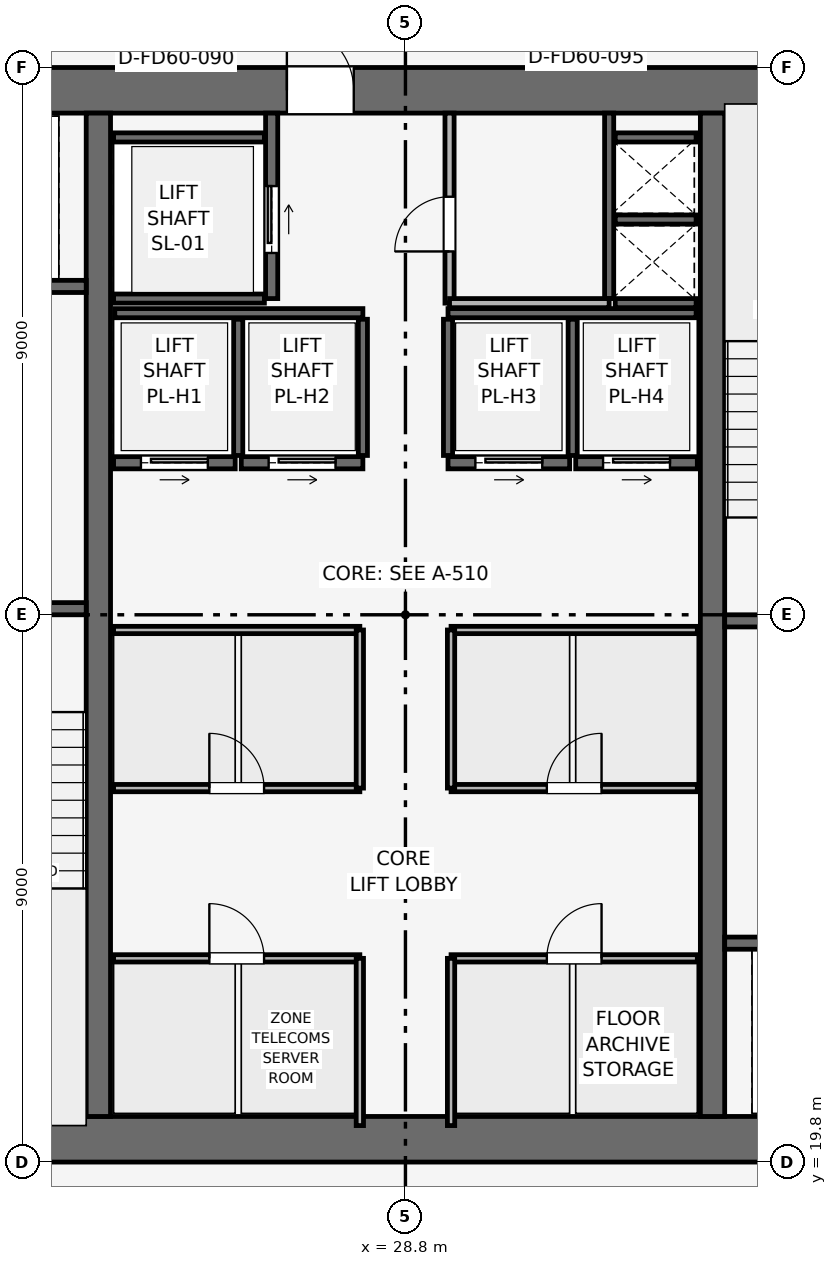
"""IFC4 building model, lengths in metres.
Left out: names, types, materials, properties, quantities, classifications, styles, units other than length and angle.
Written with IfcOpenShell. Run it as: python <this file> out.ifc"""

import sys

from ifc_helpers import new_model, si_unit, direction, frame, frame_2d, origin, place, context, subcontext, project, spatial, rectangle, extrude, element, fill, save


model = new_model("IFC4")
c1 = context("Model", 3, precision=1e-05, world=origin(), true_north=direction((0.0, 1.0)))
c2 = subcontext(c1, "Body", "Model", "MODEL_VIEW")
j1 = project(units=[si_unit("LENGTHUNIT", "METRE"), si_unit("PLANEANGLEUNIT", "RADIAN")], contexts=[c1])
p1 = place(None, origin())
s1 = spatial("IfcSite", under=j1, at=p1, CompositionType="ELEMENT")
p2 = place(p1, origin())
s2 = spatial("IfcBuilding", under=s1, at=p2, CompositionType="ELEMENT")
p3 = place(p2, frame((0.0, 0.0, 272.85)))
s3 = spatial("IfcBuildingStorey", under=s2, at=p3, CompositionType="ELEMENT", Elevation=272.85)
p4 = place(p3, frame((19.8, 20.175, 0.0), z_axis=(0.0, 0.0, 1.0), x_axis=(1.0, 0.0, 0.0)))
e1 = element("IfcWall", 1, at=p4, inside=s3, PredefinedType="SHEAR", context=c2, shape_type="SweptSolid", body=[
    extrude(rectangle(XDim=18.0, YDim=0.75, at=frame_2d((9.0, 0.0))), origin(), (0.0, 0.0, 1.0), 3.75),
])
p5 = place(p3, frame((19.8, 37.425, 0.0), z_axis=(0.0, 0.0, 1.0), x_axis=(1.0, 0.0, 0.0)))
e2 = element("IfcWall", 2, at=p5, inside=s3, PredefinedType="SHEAR", context=c2, shape_type="SweptSolid", body=[
    extrude(rectangle(XDim=18.0, YDim=0.75, at=frame_2d((9.0, 0.0))), origin(), (0.0, 0.0, 1.0), 3.75),
])
p6 = place(p5, frame((7.05, 0.0, 0.0)))
e3 = element("IfcOpeningElement", 3, at=p6, cuts=e2, PredefinedType="OPENING", context=c2, shape_type="SweptSolid", body=[
    extrude(rectangle(XDim=1.1, YDim=2.15, at=frame_2d((0.55, 1.075))), frame((0.0, 0.385, 0.0), z_axis=(0.0, -1.0, 0.0), x_axis=(1.0, 0.0, 0.0)), (0.0, 0.0, 1.0), 0.77),
])
for number, where, z_axis, x_axis in (
    (4, (23.75, 20.55, 0.0), (0.0, 0.0, 1.0), (0.0, 1.0, 0.0)),
    (5, (33.85, 20.55, 0.0), (0.0, 0.0, 1.0), (0.0, 1.0, 0.0)),
):
    element("IfcWall", number, at=place(p3, frame(where, z_axis=z_axis, x_axis=x_axis)), inside=s3, PredefinedType="SHEAR", context=c2, shape_type="SweptSolid", body=[
        extrude(rectangle(XDim=16.5, YDim=0.4, at=frame_2d((8.25, 0.0))), origin(), (0.0, 0.0, 1.0), 3.75),
    ])
p7 = place(p3, frame((20.4, 28.9, 0.0), z_axis=(0.0, 0.0, 1.0), x_axis=(1.0, 0.0, 0.0)))
e6 = element("IfcWall", 6, at=p7, inside=s3, PredefinedType="SHEAR", context=c2, shape_type="SweptSolid", body=[
    extrude(rectangle(XDim=3.15, YDim=0.2, at=frame_2d((1.575, 0.0))), origin(), (0.0, 0.0, 1.0), 3.5),
])
p8 = place(p7, frame((0.8, 0.0, 0.0)))
e7 = element("IfcOpeningElement", 7, at=p8, cuts=e6, PredefinedType="OPENING", context=c2, shape_type="SweptSolid", body=[
    extrude(rectangle(XDim=1.0, YDim=2.1, at=frame_2d((0.5, 1.05))), frame((0.0, 0.11, 0.0), z_axis=(0.0, -1.0, 0.0), x_axis=(1.0, 0.0, 0.0)), (0.0, 0.0, 1.0), 0.22),
])
p9 = place(p3, frame((34.05, 28.7, 0.0), z_axis=(0.0, 0.0, 1.0), x_axis=(1.0, 0.0, 0.0)))
e8 = element("IfcWall", 8, at=p9, inside=s3, PredefinedType="SHEAR", context=c2, shape_type="SweptSolid", body=[
    extrude(rectangle(XDim=3.15, YDim=0.2, at=frame_2d((1.575, 0.0))), origin(), (0.0, 0.0, 1.0), 3.5),
])
p10 = place(p9, frame((0.8, 0.0, 0.0)))
e9 = element("IfcOpeningElement", 9, at=p10, cuts=e8, PredefinedType="OPENING", context=c2, shape_type="SweptSolid", body=[
    extrude(rectangle(XDim=1.0, YDim=2.1, at=frame_2d((0.5, 1.05))), frame((0.0, 0.11, 0.0), z_axis=(0.0, -1.0, 0.0), x_axis=(1.0, 0.0, 0.0)), (0.0, 0.0, 1.0), 0.22),
])
p11 = place(p3, frame((32.15, 34.0, 0.0), z_axis=(0.0, 0.0, 1.0), x_axis=(0.0, 1.0, 0.0)))
e10 = element("IfcWall", 10, at=p11, inside=s3, PredefinedType="SHEAR", context=c2, shape_type="SweptSolid", body=[
    extrude(rectangle(XDim=3.05, YDim=0.15, at=frame_2d((1.525, 0.0))), origin(), (0.0, 0.0, 1.0), 3.5),
])
for number, where, z_axis, x_axis in (
    (11, (32.25, 33.925, 0.0), (0.0, 0.0, 1.0), (1.0, 0.0, 0.0)),
    (12, (32.25, 35.3, 0.0), (0.0, 0.0, 1.0), (1.0, 0.0, 0.0)),
):
    element("IfcWall", number, at=place(p3, frame(where, z_axis=z_axis, x_axis=x_axis)), inside=s3, PredefinedType="SHEAR", context=c2, shape_type="SweptSolid", body=[
        extrude(rectangle(XDim=1.33, YDim=0.15, at=frame_2d((0.665, 0.0))), origin(), (0.0, 0.0, 1.0), 3.5),
    ])
p12 = place(p3, frame((20.5, 34.2, 0.0), z_axis=(0.0, 0.0, 1.0), x_axis=(1.0, 0.0, 0.0)))
e13 = element("IfcWall", 13, at=p12, inside=s3, PredefinedType="SHEAR", context=c2, shape_type="SweptSolid", body=[
    extrude(rectangle(XDim=3.05, YDim=0.2, at=frame_2d((1.525, 0.0))), origin(), (0.0, 0.0, 1.0), 3.5),
])
p13 = place(p12, frame((0.75, 0.0, 0.0)))
e14 = element("IfcOpeningElement", 14, at=p13, cuts=e13, PredefinedType="OPENING", context=c2, shape_type="SweptSolid", body=[
    extrude(rectangle(XDim=1.1, YDim=2.15, at=frame_2d((0.55, 1.075))), frame((0.0, 0.11, 0.0), z_axis=(0.0, -1.0, 0.0), x_axis=(1.0, 0.0, 0.0)), (0.0, 0.0, 1.0), 0.22),
])
p14 = place(p3, frame((34.05, 23.4, 0.0), z_axis=(0.0, 0.0, 1.0), x_axis=(1.0, 0.0, 0.0)))
e15 = element("IfcWall", 15, at=p14, inside=s3, PredefinedType="SHEAR", context=c2, shape_type="SweptSolid", body=[
    extrude(rectangle(XDim=3.05, YDim=0.2, at=frame_2d((1.525, 0.0))), origin(), (0.0, 0.0, 1.0), 3.5),
])
p15 = place(p14, frame((1.2, 0.0, 0.0)))
e16 = element("IfcOpeningElement", 16, at=p15, cuts=e15, PredefinedType="OPENING", context=c2, shape_type="SweptSolid", body=[
    extrude(rectangle(XDim=1.1, YDim=2.15, at=frame_2d((0.55, 1.075))), frame((0.0, 0.11, 0.0), z_axis=(0.0, -1.0, 0.0), x_axis=(1.0, 0.0, 0.0)), (0.0, 0.0, 1.0), 0.22),
])
p16 = place(p3, frame((26.6, 34.0, 0.0), z_axis=(0.0, 0.0, 1.0), x_axis=(0.0, 1.0, 0.0)))
e17 = element("IfcWall", 17, at=p16, inside=s3, PredefinedType="SHEAR", context=c2, shape_type="SweptSolid", body=[
    extrude(rectangle(XDim=3.05, YDim=0.2, at=frame_2d((1.525, 0.0))), origin(), (0.0, 0.0, 1.0), 3.5),
])
p17 = place(p16, frame((0.75, 0.0, 0.0)))
e18 = element("IfcOpeningElement", 18, at=p17, cuts=e17, PredefinedType="OPENING", context=c2, shape_type="SweptSolid", body=[
    extrude(rectangle(XDim=1.1, YDim=2.15, at=frame_2d((0.55, 1.075))), frame((0.0, 0.11, 0.0), z_axis=(0.0, -1.0, 0.0), x_axis=(1.0, 0.0, 0.0)), (0.0, 0.0, 1.0), 0.22),
])
for number, where, z_axis, x_axis in (
    (19, (24.0, 34.0, 0.0), (0.0, 0.0, 1.0), (1.0, 0.0, 0.0)),
    (20, (24.0, 36.65, 0.0), (0.0, 0.0, 1.0), (1.0, 0.0, 0.0)),
):
    element("IfcWall", number, at=place(p3, frame(where, z_axis=z_axis, x_axis=x_axis)), inside=s3, PredefinedType="SHEAR", context=c2, shape_type="SweptSolid", body=[
        extrude(rectangle(XDim=2.48, YDim=0.15, at=frame_2d((1.24, 0.0))), origin(), (0.0, 0.0, 1.0), 3.5),
    ])
p18 = place(p3, frame((24.0, 31.3, 0.0), z_axis=(0.0, 0.0, 1.0), x_axis=(1.0, 0.0, 0.0)))
e21 = element("IfcWall", 21, at=p18, inside=s3, PredefinedType="SHEAR", context=c2, shape_type="SweptSolid", body=[
    extrude(rectangle(XDim=2.0, YDim=0.2, at=frame_2d((1.0, 0.0))), origin(), (0.0, 0.0, 1.0), 3.5),
])
p19 = place(p18, frame((0.45, 0.0, 0.0)))
e22 = element("IfcOpeningElement", 22, at=p19, cuts=e21, PredefinedType="OPENING", context=c2, shape_type="SweptSolid", body=[
    extrude(rectangle(XDim=1.1, YDim=2.15, at=frame_2d((0.55, 1.075))), frame((0.0, 0.11, 0.0), z_axis=(0.0, -1.0, 0.0), x_axis=(1.0, 0.0, 0.0)), (0.0, 0.0, 1.0), 0.22),
])
p20 = place(p3, frame((26.1, 31.3, 0.0), z_axis=(0.0, 0.0, 1.0), x_axis=(1.0, 0.0, 0.0)))
e23 = element("IfcWall", 23, at=p20, inside=s3, PredefinedType="SHEAR", context=c2, shape_type="SweptSolid", body=[
    extrude(rectangle(XDim=2.0, YDim=0.2, at=frame_2d((1.0, 0.0))), origin(), (0.0, 0.0, 1.0), 3.5),
])
p21 = place(p20, frame((0.45, 0.0, 0.0)))
e24 = element("IfcOpeningElement", 24, at=p21, cuts=e23, PredefinedType="OPENING", context=c2, shape_type="SweptSolid", body=[
    extrude(rectangle(XDim=1.1, YDim=2.15, at=frame_2d((0.55, 1.075))), frame((0.0, 0.11, 0.0), z_axis=(0.0, -1.0, 0.0), x_axis=(1.0, 0.0, 0.0)), (0.0, 0.0, 1.0), 0.22),
])
p22 = place(p3, frame((29.5, 31.3, 0.0), z_axis=(0.0, 0.0, 1.0), x_axis=(1.0, 0.0, 0.0)))
e25 = element("IfcWall", 25, at=p22, inside=s3, PredefinedType="SHEAR", context=c2, shape_type="SweptSolid", body=[
    extrude(rectangle(XDim=2.0, YDim=0.2, at=frame_2d((1.0, 0.0))), origin(), (0.0, 0.0, 1.0), 3.5),
])
p23 = place(p22, frame((0.45, 0.0, 0.0)))
e26 = element("IfcOpeningElement", 26, at=p23, cuts=e25, PredefinedType="OPENING", context=c2, shape_type="SweptSolid", body=[
    extrude(rectangle(XDim=1.1, YDim=2.15, at=frame_2d((0.55, 1.075))), frame((0.0, 0.11, 0.0), z_axis=(0.0, -1.0, 0.0), x_axis=(1.0, 0.0, 0.0)), (0.0, 0.0, 1.0), 0.22),
])
p24 = place(p3, frame((31.6, 31.3, 0.0), z_axis=(0.0, 0.0, 1.0), x_axis=(1.0, 0.0, 0.0)))
e27 = element("IfcWall", 27, at=p24, inside=s3, PredefinedType="SHEAR", context=c2, shape_type="SweptSolid", body=[
    extrude(rectangle(XDim=2.0, YDim=0.2, at=frame_2d((1.0, 0.0))), origin(), (0.0, 0.0, 1.0), 3.5),
])
p25 = place(p24, frame((0.45, 0.0, 0.0)))
e28 = element("IfcOpeningElement", 28, at=p25, cuts=e27, PredefinedType="OPENING", context=c2, shape_type="SweptSolid", body=[
    extrude(rectangle(XDim=1.1, YDim=2.15, at=frame_2d((0.55, 1.075))), frame((0.0, 0.11, 0.0), z_axis=(0.0, -1.0, 0.0), x_axis=(1.0, 0.0, 0.0)), (0.0, 0.0, 1.0), 0.22),
])
p26 = place(p3, frame((32.25, 36.65, 0.0), z_axis=(0.0, 0.0, 1.0), x_axis=(1.0, 0.0, 0.0)))
e29 = element("IfcWall", 29, at=p26, inside=s3, PredefinedType="SHEAR", context=c2, shape_type="SweptSolid", body=[
    extrude(rectangle(XDim=1.33, YDim=0.15, at=frame_2d((0.665, 0.0))), origin(), (0.0, 0.0, 1.0), 3.5),
])
for number, where, z_axis, x_axis in (
    (30, (24.02, 33.76, 0.0), (0.0, 0.0, 1.0), (1.0, 0.0, 0.0)),
    (31, (29.5, 33.76, 0.0), (0.0, 0.0, 1.0), (1.0, 0.0, 0.0)),
):
    element("IfcWall", number, at=place(p3, frame(where, z_axis=z_axis, x_axis=x_axis)), inside=s3, PredefinedType="SHEAR", context=c2, shape_type="SweptSolid", body=[
        extrude(rectangle(XDim=4.08, YDim=0.15, at=frame_2d((2.04, 0.0))), origin(), (0.0, 0.0, 1.0), 3.5),
    ])
for number, where, z_axis, x_axis in (
    (32, (26.05, 31.42, 0.0), (0.0, 0.0, 1.0), (0.0, 1.0, 0.0)),
    (33, (28.1, 31.42, 0.0), (0.0, 0.0, 1.0), (0.0, 1.0, 0.0)),
    (34, (29.5, 31.42, 0.0), (0.0, 0.0, 1.0), (0.0, 1.0, 0.0)),
    (35, (31.55, 31.42, 0.0), (0.0, 0.0, 1.0), (0.0, 1.0, 0.0)),
):
    element("IfcWall", number, at=place(p3, frame(where, z_axis=z_axis, x_axis=x_axis)), inside=s3, PredefinedType="SHEAR", context=c2, shape_type="SweptSolid", body=[
        extrude(rectangle(XDim=2.24, YDim=0.15, at=frame_2d((1.12, 0.0))), origin(), (0.0, 0.0, 1.0), 3.5),
    ])
p27 = place(p3, frame((29.525, 33.925, 0.0), z_axis=(0.0, 0.0, 1.0), x_axis=(0.0, 1.0, 0.0)))
e36 = element("IfcWall", 36, at=p27, inside=s3, PredefinedType="PARTITIONING", context=c2, shape_type="SweptSolid", body=[
    extrude(rectangle(XDim=3.125, YDim=0.15, at=frame_2d((1.562, 0.0))), origin(), (0.0, 0.0, 1.0), 3.5),
])
p28 = place(p27, frame((0.85, 0.0, 0.0)))
e37 = element("IfcOpeningElement", 37, at=p28, cuts=e36, PredefinedType="OPENING", context=c2, shape_type="SweptSolid", body=[
    extrude(rectangle(XDim=0.9, YDim=2.1, at=frame_2d((0.45, 1.05))), frame((0.0, 0.085, 0.0), z_axis=(0.0, -1.0, 0.0), x_axis=(1.0, 0.0, 0.0)), (0.0, 0.0, 1.0), 0.17),
])
p29 = place(p3, frame((29.525, 33.925, 0.0), z_axis=(0.0, 0.0, 1.0), x_axis=(1.0, 0.0, 0.0)))
e38 = element("IfcWall", 38, at=p29, inside=s3, PredefinedType="PARTITIONING", context=c2, shape_type="SweptSolid", body=[
    extrude(rectangle(XDim=2.625, YDim=0.15, at=frame_2d((1.312, 0.0))), origin(), (0.0, 0.0, 1.0), 3.5),
])
p30 = place(p3, frame((24.0, 23.15, 0.0), z_axis=(0.0, 0.0, 1.0), x_axis=(1.0, 0.0, 0.0)))
e39 = element("IfcWall", 39, at=p30, inside=s3, PredefinedType="PARTITIONING", context=c2, shape_type="SweptSolid", body=[
    extrude(rectangle(XDim=4.05, YDim=0.12, at=frame_2d((2.025, 0.0))), origin(), (0.0, 0.0, 1.0), 3.5),
])
p31 = place(p30, frame((1.575, 0.0, 0.0)))
e40 = element("IfcOpeningElement", 40, at=p31, cuts=e39, PredefinedType="OPENING", context=c2, shape_type="SweptSolid", body=[
    extrude(rectangle(XDim=0.9, YDim=2.1, at=frame_2d((0.45, 1.05))), frame((0.0, 0.07, 0.0), z_axis=(0.0, -1.0, 0.0), x_axis=(1.0, 0.0, 0.0)), (0.0, 0.0, 1.0), 0.14),
])
p32 = place(p3, frame((28.05, 20.4, 0.0), z_axis=(0.0, 0.0, 1.0), x_axis=(0.0, 1.0, 0.0)))
e41 = element("IfcWall", 41, at=p32, inside=s3, PredefinedType="PARTITIONING", context=c2, shape_type="SweptSolid", body=[
    extrude(rectangle(XDim=2.75, YDim=0.12, at=frame_2d((1.375, 0.0))), origin(), (0.0, 0.0, 1.0), 3.5),
])
p33 = place(p3, frame((29.55, 23.15, 0.0), z_axis=(0.0, 0.0, 1.0), x_axis=(1.0, 0.0, 0.0)))
e42 = element("IfcWall", 42, at=p33, inside=s3, PredefinedType="PARTITIONING", context=c2, shape_type="SweptSolid", body=[
    extrude(rectangle(XDim=4.05, YDim=0.12, at=frame_2d((2.025, 0.0))), origin(), (0.0, 0.0, 1.0), 3.5),
])
p34 = place(p33, frame((1.575, 0.0, 0.0)))
e43 = element("IfcOpeningElement", 43, at=p34, cuts=e42, PredefinedType="OPENING", context=c2, shape_type="SweptSolid", body=[
    extrude(rectangle(XDim=0.9, YDim=2.1, at=frame_2d((0.45, 1.05))), frame((0.0, 0.07, 0.0), z_axis=(0.0, -1.0, 0.0), x_axis=(1.0, 0.0, 0.0)), (0.0, 0.0, 1.0), 0.14),
])
p35 = place(p3, frame((29.55, 20.4, 0.0), z_axis=(0.0, 0.0, 1.0), x_axis=(0.0, 1.0, 0.0)))
e44 = element("IfcWall", 44, at=p35, inside=s3, PredefinedType="PARTITIONING", context=c2, shape_type="SweptSolid", body=[
    extrude(rectangle(XDim=2.75, YDim=0.12, at=frame_2d((1.375, 0.0))), origin(), (0.0, 0.0, 1.0), 3.5),
])
p36 = place(p3, frame((24.0, 25.95, 0.0), z_axis=(0.0, 0.0, 1.0), x_axis=(1.0, 0.0, 0.0)))
e45 = element("IfcWall", 45, at=p36, inside=s3, PredefinedType="PARTITIONING", context=c2, shape_type="SweptSolid", body=[
    extrude(rectangle(XDim=4.05, YDim=0.12, at=frame_2d((2.025, 0.0))), origin(), (0.0, 0.0, 1.0), 3.5),
])
p37 = place(p36, frame((1.575, 0.0, 0.0)))
e46 = element("IfcOpeningElement", 46, at=p37, cuts=e45, PredefinedType="OPENING", context=c2, shape_type="SweptSolid", body=[
    extrude(rectangle(XDim=0.9, YDim=2.1, at=frame_2d((0.45, 1.05))), frame((0.0, 0.07, 0.0), z_axis=(0.0, -1.0, 0.0), x_axis=(1.0, 0.0, 0.0)), (0.0, 0.0, 1.0), 0.14),
])
p38 = place(p3, frame((24.0, 28.55, 0.0), z_axis=(0.0, 0.0, 1.0), x_axis=(1.0, 0.0, 0.0)))
e47 = element("IfcWall", 47, at=p38, inside=s3, PredefinedType="PARTITIONING", context=c2, shape_type="SweptSolid", body=[
    extrude(rectangle(XDim=4.05, YDim=0.12, at=frame_2d((2.025, 0.0))), origin(), (0.0, 0.0, 1.0), 3.5),
])
p39 = place(p3, frame((28.05, 25.95, 0.0), z_axis=(0.0, 0.0, 1.0), x_axis=(0.0, 1.0, 0.0)))
e48 = element("IfcWall", 48, at=p39, inside=s3, PredefinedType="PARTITIONING", context=c2, shape_type="SweptSolid", body=[
    extrude(rectangle(XDim=2.6, YDim=0.12, at=frame_2d((1.3, 0.0))), origin(), (0.0, 0.0, 1.0), 3.5),
])
p40 = place(p3, frame((29.55, 25.95, 0.0), z_axis=(0.0, 0.0, 1.0), x_axis=(1.0, 0.0, 0.0)))
e49 = element("IfcWall", 49, at=p40, inside=s3, PredefinedType="PARTITIONING", context=c2, shape_type="SweptSolid", body=[
    extrude(rectangle(XDim=4.05, YDim=0.12, at=frame_2d((2.025, 0.0))), origin(), (0.0, 0.0, 1.0), 3.5),
])
p41 = place(p40, frame((1.575, 0.0, 0.0)))
e50 = element("IfcOpeningElement", 50, at=p41, cuts=e49, PredefinedType="OPENING", context=c2, shape_type="SweptSolid", body=[
    extrude(rectangle(XDim=0.9, YDim=2.1, at=frame_2d((0.45, 1.05))), frame((0.0, 0.07, 0.0), z_axis=(0.0, -1.0, 0.0), x_axis=(1.0, 0.0, 0.0)), (0.0, 0.0, 1.0), 0.14),
])
p42 = place(p3, frame((29.55, 28.55, 0.0), z_axis=(0.0, 0.0, 1.0), x_axis=(1.0, 0.0, 0.0)))
e51 = element("IfcWall", 51, at=p42, inside=s3, PredefinedType="PARTITIONING", context=c2, shape_type="SweptSolid", body=[
    extrude(rectangle(XDim=4.05, YDim=0.12, at=frame_2d((2.025, 0.0))), origin(), (0.0, 0.0, 1.0), 3.5),
])
p43 = place(p3, frame((29.55, 25.95, 0.0), z_axis=(0.0, 0.0, 1.0), x_axis=(0.0, 1.0, 0.0)))
e52 = element("IfcWall", 52, at=p43, inside=s3, PredefinedType="PARTITIONING", context=c2, shape_type="SweptSolid", body=[
    extrude(rectangle(XDim=2.6, YDim=0.12, at=frame_2d((1.3, 0.0))), origin(), (0.0, 0.0, 1.0), 3.5),
])
p44 = place(p17, origin())
e53 = element("IfcDoor", 53, at=p44, inside=s3, OperationType="SLIDING_TO_RIGHT", PredefinedType="DOOR", context=c2, shape_type="SweptSolid", body=[
    extrude(rectangle(XDim=1.1, YDim=2.15, at=frame_2d((0.55, 1.075))), frame((0.0, 0.025, 0.0), z_axis=(0.0, -1.0, 0.0), x_axis=(1.0, 0.0, 0.0)), (0.0, 0.0, 1.0), 0.05),
])
fill(e18, e53)
p45 = place(p19, origin())
e54 = element("IfcDoor", 54, at=p45, inside=s3, OperationType="SLIDING_TO_RIGHT", PredefinedType="DOOR", context=c2, shape_type="SweptSolid", body=[
    extrude(rectangle(XDim=1.1, YDim=2.15, at=frame_2d((0.55, 1.075))), frame((0.0, 0.025, 0.0), z_axis=(0.0, -1.0, 0.0), x_axis=(1.0, 0.0, 0.0)), (0.0, 0.0, 1.0), 0.05),
])
fill(e22, e54)
p46 = place(p21, origin())
e55 = element("IfcDoor", 55, at=p46, inside=s3, OperationType="SLIDING_TO_RIGHT", PredefinedType="DOOR", context=c2, shape_type="SweptSolid", body=[
    extrude(rectangle(XDim=1.1, YDim=2.15, at=frame_2d((0.55, 1.075))), frame((0.0, 0.025, 0.0), z_axis=(0.0, -1.0, 0.0), x_axis=(1.0, 0.0, 0.0)), (0.0, 0.0, 1.0), 0.05),
])
fill(e24, e55)
p47 = place(p23, origin())
e56 = element("IfcDoor", 56, at=p47, inside=s3, OperationType="SLIDING_TO_RIGHT", PredefinedType="DOOR", context=c2, shape_type="SweptSolid", body=[
    extrude(rectangle(XDim=1.1, YDim=2.15, at=frame_2d((0.55, 1.075))), frame((0.0, 0.025, 0.0), z_axis=(0.0, -1.0, 0.0), x_axis=(1.0, 0.0, 0.0)), (0.0, 0.0, 1.0), 0.05),
])
fill(e26, e56)
p48 = place(p25, origin())
e57 = element("IfcDoor", 57, at=p48, inside=s3, OperationType="SLIDING_TO_RIGHT", PredefinedType="DOOR", context=c2, shape_type="SweptSolid", body=[
    extrude(rectangle(XDim=1.1, YDim=2.15, at=frame_2d((0.55, 1.075))), frame((0.0, 0.025, 0.0), z_axis=(0.0, -1.0, 0.0), x_axis=(1.0, 0.0, 0.0)), (0.0, 0.0, 1.0), 0.05),
])
fill(e28, e57)
p49 = place(p28, origin())
e58 = element("IfcDoor", 58, at=p49, inside=s3, OperationType="SINGLE_SWING_LEFT", PredefinedType="DOOR", context=c2, shape_type="SweptSolid", body=[
    extrude(rectangle(XDim=0.9, YDim=2.1, at=frame_2d((0.45, 1.05))), frame((0.0, 0.025, 0.0), z_axis=(0.0, -1.0, 0.0), x_axis=(1.0, 0.0, 0.0)), (0.0, 0.0, 1.0), 0.05),
])
fill(e37, e58)
p50 = place(p31, origin())
e59 = element("IfcDoor", 59, at=p50, inside=s3, OperationType="SINGLE_SWING_LEFT", PredefinedType="DOOR", context=c2, shape_type="SweptSolid", body=[
    extrude(rectangle(XDim=0.9, YDim=2.1, at=frame_2d((0.45, 1.05))), frame((0.0, 0.025, 0.0), z_axis=(0.0, -1.0, 0.0), x_axis=(1.0, 0.0, 0.0)), (0.0, 0.0, 1.0), 0.05),
])
fill(e40, e59)
p51 = place(p34, origin())
e60 = element("IfcDoor", 60, at=p51, inside=s3, OperationType="SINGLE_SWING_RIGHT", PredefinedType="DOOR", context=c2, shape_type="SweptSolid", body=[
    extrude(rectangle(XDim=0.9, YDim=2.1, at=frame_2d((0.45, 1.05))), frame((0.0, 0.025, 0.0), z_axis=(0.0, -1.0, 0.0), x_axis=(1.0, 0.0, 0.0)), (0.0, 0.0, 1.0), 0.05),
])
fill(e43, e60)
p52 = place(p37, origin())
e61 = element("IfcDoor", 61, at=p52, inside=s3, OperationType="SINGLE_SWING_LEFT", PredefinedType="DOOR", context=c2, shape_type="SweptSolid", body=[
    extrude(rectangle(XDim=0.9, YDim=2.1, at=frame_2d((0.45, 1.05))), frame((0.0, 0.025, 0.0), z_axis=(0.0, -1.0, 0.0), x_axis=(1.0, 0.0, 0.0)), (0.0, 0.0, 1.0), 0.05),
])
fill(e46, e61)
p53 = place(p41, origin())
e62 = element("IfcDoor", 62, at=p53, inside=s3, OperationType="SINGLE_SWING_RIGHT", PredefinedType="DOOR", context=c2, shape_type="SweptSolid", body=[
    extrude(rectangle(XDim=0.9, YDim=2.1, at=frame_2d((0.45, 1.05))), frame((0.0, 0.025, 0.0), z_axis=(0.0, -1.0, 0.0), x_axis=(1.0, 0.0, 0.0)), (0.0, 0.0, 1.0), 0.05),
])
fill(e50, e62)
p54 = place(p6, origin())
e63 = element("IfcDoor", 63, at=p54, inside=s3, OperationType="SINGLE_SWING_LEFT", PredefinedType="DOOR", context=c2, shape_type="SweptSolid", body=[
    extrude(rectangle(XDim=1.1, YDim=2.15, at=frame_2d((0.55, 1.075))), frame((0.0, 0.025, 0.0), z_axis=(0.0, -1.0, 0.0), x_axis=(1.0, 0.0, 0.0)), (0.0, 0.0, 1.0), 0.05),
])
fill(e3, e63)
save(model, sys.argv[1])
